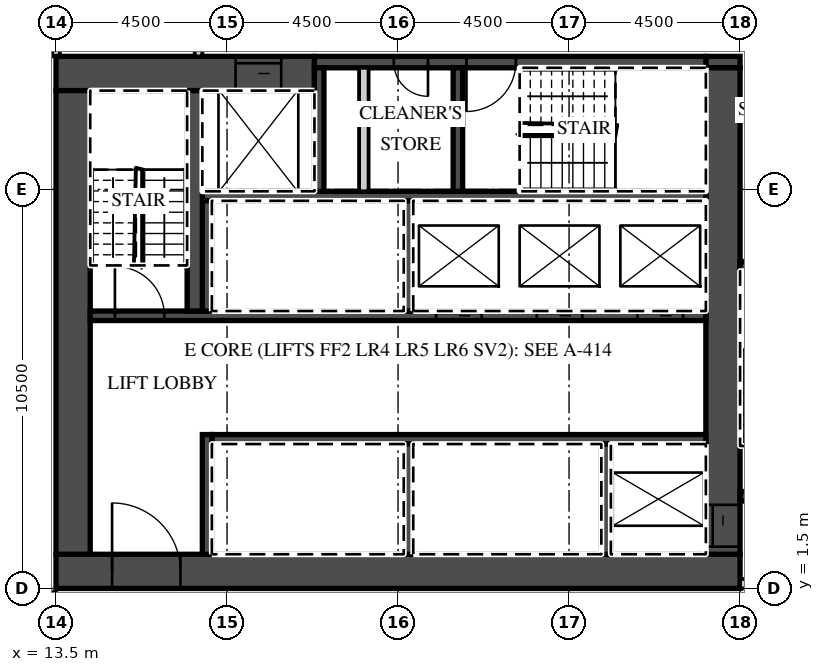
"""IFC4 building model, lengths in metres.
Left out: names, types, materials, properties, quantities, classifications, styles, units other than length and angle.
Written with IfcOpenShell. Run it as: python <this file> out.ifc"""

import sys

from ifc_helpers import new_model, si_unit, direction, frame, frame_2d, origin, place, context, subcontext, project, spatial, rectangle, extrude, element, fill, save


model = new_model("IFC4")
c1 = context("Model", 3, precision=1e-05, world=origin(), true_north=direction((0.0, 1.0)))
c2 = subcontext(c1, "Body", "Model", "MODEL_VIEW")
j1 = project(units=[si_unit("LENGTHUNIT", "METRE"), si_unit("PLANEANGLEUNIT", "RADIAN")], contexts=[c1])
p1 = place(None, origin())
s1 = spatial("IfcSite", under=j1, at=p1, CompositionType="ELEMENT")
p2 = place(p1, origin())
s2 = spatial("IfcBuilding", under=s1, at=p2, CompositionType="ELEMENT")
p3 = place(p2, frame((0.0, 0.0, 147.1)))
s3 = spatial("IfcBuildingStorey", under=s2, at=p3, CompositionType="ELEMENT", Elevation=147.1)
p4 = place(p3, frame((13.5, 15.5, 0.0), z_axis=(0.0, 0.0, 1.0), x_axis=(0.0, 1.0, 0.0)))
e1 = element("IfcWall", 1, at=p4, inside=s3, PredefinedType="PARTITIONING", context=c2, shape_type="SweptSolid", body=[
    extrude(rectangle(XDim=7.162, YDim=0.2, at=frame_2d((3.581, 0.0))), origin(), (0.0, 0.0, 1.0), 3.0),
])
p5 = place(p3, frame((-39.316, 1.3, 0.0), z_axis=(0.0, 0.0, 1.0), x_axis=(1.0, 0.0, 0.0)))
e2 = element("IfcWall", 2, at=p5, inside=s3, PredefinedType="PARTITIONING", context=c2, shape_type="SweptSolid", body=[
    extrude(rectangle(XDim=52.816, YDim=0.2, at=frame_2d((26.408, 0.0))), origin(), (0.0, 0.0, 1.0), 3.0),
])
p6 = place(p5, frame((0.15, 0.0, 0.0)))
e3 = element("IfcOpeningElement", 3, at=p6, cuts=e2, PredefinedType="OPENING", context=c2, shape_type="SweptSolid", body=[
    extrude(rectangle(XDim=0.9, YDim=2.1, at=frame_2d((0.45, 1.05))), frame((0.0, 0.11, 0.0), z_axis=(0.0, -1.0, 0.0), x_axis=(1.0, 0.0, 0.0)), (0.0, 0.0, 1.0), 0.22),
])
p7 = place(p5, frame((5.754, 0.0, 0.0)))
e4 = element("IfcOpeningElement", 4, at=p7, cuts=e2, PredefinedType="OPENING", context=c2, shape_type="SweptSolid", body=[
    extrude(rectangle(XDim=1.2, YDim=2.1, at=frame_2d((0.6, 1.05))), frame((0.0, 0.11, 0.0), z_axis=(0.0, -1.0, 0.0), x_axis=(1.0, 0.0, 0.0)), (0.0, 0.0, 1.0), 0.22),
])
p8 = place(p5, frame((14.754, 0.0, 0.0)))
e5 = element("IfcOpeningElement", 5, at=p8, cuts=e2, PredefinedType="OPENING", context=c2, shape_type="SweptSolid", body=[
    extrude(rectangle(XDim=1.2, YDim=2.1, at=frame_2d((0.6, 1.05))), frame((0.0, 0.11, 0.0), z_axis=(0.0, -1.0, 0.0), x_axis=(1.0, 0.0, 0.0)), (0.0, 0.0, 1.0), 0.22),
])
p9 = place(p5, frame((23.754, 0.0, 0.0)))
e6 = element("IfcOpeningElement", 6, at=p9, cuts=e2, PredefinedType="OPENING", context=c2, shape_type="SweptSolid", body=[
    extrude(rectangle(XDim=1.2, YDim=2.1, at=frame_2d((0.6, 1.05))), frame((0.0, 0.11, 0.0), z_axis=(0.0, -1.0, 0.0), x_axis=(1.0, 0.0, 0.0)), (0.0, 0.0, 1.0), 0.22),
])
p10 = place(p5, frame((35.678, 0.0, 0.0)))
e7 = element("IfcOpeningElement", 7, at=p10, cuts=e2, PredefinedType="OPENING", context=c2, shape_type="SweptSolid", body=[
    extrude(rectangle(XDim=1.2, YDim=2.1, at=frame_2d((0.6, 1.05))), frame((0.0, 0.11, 0.0), z_axis=(0.0, -1.0, 0.0), x_axis=(1.0, 0.0, 0.0)), (0.0, 0.0, 1.0), 0.22),
])
p11 = place(p5, frame((44.678, 0.0, 0.0)))
e8 = element("IfcOpeningElement", 8, at=p11, cuts=e2, PredefinedType="OPENING", context=c2, shape_type="SweptSolid", body=[
    extrude(rectangle(XDim=1.2, YDim=2.1, at=frame_2d((0.6, 1.05))), frame((0.0, 0.11, 0.0), z_axis=(0.0, -1.0, 0.0), x_axis=(1.0, 0.0, 0.0)), (0.0, 0.0, 1.0), 0.22),
])
p12 = place(p5, frame((51.241, 0.0, 0.0)))
e9 = element("IfcOpeningElement", 9, at=p12, cuts=e2, PredefinedType="OPENING", context=c2, shape_type="SweptSolid", body=[
    extrude(rectangle(XDim=1.0, YDim=2.1, at=frame_2d((0.5, 1.05))), frame((0.0, 0.11, 0.0), z_axis=(0.0, -1.0, 0.0), x_axis=(1.0, 0.0, 0.0)), (0.0, 0.0, 1.0), 0.22),
])
p13 = place(p3, frame((13.5, 1.95, 0.0), z_axis=(0.0, 0.0, 1.0), x_axis=(1.0, 0.0, 0.0)))
e10 = element("IfcWall", 10, at=p13, inside=s3, PredefinedType="SHEAR", context=c2, shape_type="SweptSolid", body=[
    extrude(rectangle(XDim=18.0, YDim=0.9, at=frame_2d((9.0, 0.0))), origin(), (0.0, 0.0, 1.0), 3.0),
])
p14 = place(p13, frame((1.475, 0.0, 0.0)))
e11 = element("IfcOpeningElement", 11, at=p14, cuts=e10, PredefinedType="OPENING", context=c2, shape_type="SweptSolid", body=[
    extrude(rectangle(XDim=1.8, YDim=2.1, at=frame_2d((0.9, 1.05))), frame((0.0, 0.46, 0.0), z_axis=(0.0, -1.0, 0.0), x_axis=(1.0, 0.0, 0.0)), (0.0, 0.0, 1.0), 0.92),
])
p15 = place(p3, frame((13.5, 15.05, 0.0), z_axis=(0.0, 0.0, 1.0), x_axis=(1.0, 0.0, 0.0)))
e12 = element("IfcWall", 12, at=p15, inside=s3, PredefinedType="SHEAR", context=c2, shape_type="SweptSolid", body=[
    extrude(rectangle(XDim=6.8, YDim=0.9, at=frame_2d((3.4, 0.0))), origin(), (0.0, 0.0, 1.0), 3.0),
])
p16 = place(p15, frame((4.725, 0.0, 0.0)))
e13 = element("IfcOpeningElement", 13, at=p16, cuts=e12, PredefinedType="OPENING", context=c2, shape_type="SweptSolid", body=[
    extrude(rectangle(XDim=1.2, YDim=2.1, at=frame_2d((0.6, 1.05))), frame((0.0, 0.46, 0.0), z_axis=(0.0, -1.0, 0.0), x_axis=(1.0, 0.0, 0.0)), (0.0, 0.0, 1.0), 0.92),
])
p17 = place(p3, frame((30.6, 15.35, 0.0), z_axis=(0.0, 0.0, 1.0), x_axis=(1.0, 0.0, 0.0)))
e14 = element("IfcWall", 14, at=p17, inside=s3, PredefinedType="SHEAR", context=c2, shape_type="SweptSolid", body=[
    extrude(rectangle(XDim=0.9, YDim=0.3, at=frame_2d((0.45, 0.0))), origin(), (0.0, 0.0, 1.0), 3.0),
])
p18 = place(p3, frame((20.3, 15.35, 0.0), z_axis=(0.0, 0.0, 1.0), x_axis=(1.0, 0.0, 0.0)))
e15 = element("IfcWall", 15, at=p18, inside=s3, PredefinedType="SHEAR", context=c2, shape_type="SweptSolid", body=[
    extrude(rectangle(XDim=10.3, YDim=0.3, at=frame_2d((5.15, 0.0))), origin(), (0.0, 0.0, 1.0), 3.0),
])
p19 = place(p18, frame((4.0, 0.0, 0.0)))
e16 = element("IfcOpeningElement", 16, at=p19, cuts=e15, PredefinedType="OPENING", context=c2, shape_type="SweptSolid", body=[
    extrude(rectangle(XDim=1.3, YDim=2.1, at=frame_2d((0.65, 1.05))), frame((0.0, 0.16, 0.0), z_axis=(0.0, -1.0, 0.0), x_axis=(1.0, 0.0, 0.0)), (0.0, 0.0, 1.0), 0.32),
])
p20 = place(p18, frame((2.087, 0.0, 0.0)))
e17 = element("IfcOpeningElement", 17, at=p20, cuts=e15, PredefinedType="OPENING", context=c2, shape_type="SweptSolid", body=[
    extrude(rectangle(XDim=0.9, YDim=2.1, at=frame_2d((0.45, 1.05))), frame((0.0, 0.16, 0.0), z_axis=(0.0, -1.0, 0.0), x_axis=(1.0, 0.0, 0.0)), (0.0, 0.0, 1.0), 0.32),
])
p21 = place(p3, frame((31.05, 2.4, 0.0), z_axis=(0.0, 0.0, 1.0), x_axis=(0.0, 1.0, 0.0)))
e18 = element("IfcWall", 18, at=p21, inside=s3, PredefinedType="SHEAR", context=c2, shape_type="SweptSolid", body=[
    extrude(rectangle(XDim=12.8, YDim=0.9, at=frame_2d((6.4, 0.0))), origin(), (0.0, 0.0, 1.0), 3.0),
])
p22 = place(p21, frame((0.2, 0.0, 0.0)))
e19 = element("IfcOpeningElement", 19, at=p22, cuts=e18, PredefinedType="OPENING", context=c2, shape_type="SweptSolid", body=[
    extrude(rectangle(XDim=1.1, YDim=2.1, at=frame_2d((0.55, 1.05))), frame((0.0, 0.46, 0.0), z_axis=(0.0, -1.0, 0.0), x_axis=(1.0, 0.0, 0.0)), (0.0, 0.0, 1.0), 0.92),
])
p23 = place(p3, frame((13.95, 2.4, 0.0), z_axis=(0.0, 0.0, 1.0), x_axis=(0.0, 1.0, 0.0)))
e20 = element("IfcWall", 20, at=p23, inside=s3, PredefinedType="SHEAR", context=c2, shape_type="SweptSolid", body=[
    extrude(rectangle(XDim=12.2, YDim=0.9, at=frame_2d((6.1, 0.0))), origin(), (0.0, 0.0, 1.0), 3.0),
])
p24 = place(p3, frame((17.6, 5.425, 0.0), z_axis=(0.0, 0.0, 1.0), x_axis=(1.0, 0.0, 0.0)))
e21 = element("IfcWall", 21, at=p24, inside=s3, PredefinedType="SHEAR", context=c2, shape_type="SweptSolid", body=[
    extrude(rectangle(XDim=13.0, YDim=0.25, at=frame_2d((6.5, 0.0))), origin(), (0.0, 0.0, 1.0), 3.0),
])
p25 = place(p3, frame((17.475, 2.4, 0.0), z_axis=(0.0, 0.0, 1.0), x_axis=(0.0, 1.0, 0.0)))
e22 = element("IfcWall", 22, at=p25, inside=s3, PredefinedType="SHEAR", context=c2, shape_type="SweptSolid", body=[
    extrude(rectangle(XDim=3.15, YDim=0.25, at=frame_2d((1.575, 0.0))), origin(), (0.0, 0.0, 1.0), 3.0),
])
for number, where, z_axis, x_axis in (
    (23, (27.975, 2.4, 0.0), (0.0, 0.0, 1.0), (0.0, 1.0, 0.0)),
    (24, (22.775, 2.4, 0.0), (0.0, 0.0, 1.0), (0.0, 1.0, 0.0)),
):
    element("IfcWall", number, at=place(p3, frame(where, z_axis=z_axis, x_axis=x_axis)), inside=s3, PredefinedType="SHEAR", context=c2, shape_type="SweptSolid", body=[
        extrude(rectangle(XDim=2.9, YDim=0.25, at=frame_2d((1.45, 0.0))), origin(), (0.0, 0.0, 1.0), 3.0),
    ])
p26 = place(p3, frame((14.4, 8.675, 0.0), z_axis=(0.0, 0.0, 1.0), x_axis=(1.0, 0.0, 0.0)))
e25 = element("IfcWall", 25, at=p26, inside=s3, PredefinedType="SHEAR", context=c2, shape_type="SweptSolid", body=[
    extrude(rectangle(XDim=16.2, YDim=0.25, at=frame_2d((8.1, 0.0))), origin(), (0.0, 0.0, 1.0), 3.0),
])
p27 = place(p26, frame((14.4, 0.0, 0.0)))
e26 = element("IfcOpeningElement", 26, at=p27, cuts=e25, PredefinedType="OPENING", context=c2, shape_type="SweptSolid", body=[
    extrude(rectangle(XDim=1.2, YDim=2.1, at=frame_2d((0.6, 1.05))), frame((0.0, 0.135, 0.0), z_axis=(0.0, -1.0, 0.0), x_axis=(1.0, 0.0, 0.0)), (0.0, 0.0, 1.0), 0.27),
])
p28 = place(p26, frame((11.75, 0.0, 0.0)))
e27 = element("IfcOpeningElement", 27, at=p28, cuts=e25, PredefinedType="OPENING", context=c2, shape_type="SweptSolid", body=[
    extrude(rectangle(XDim=1.2, YDim=2.1, at=frame_2d((0.6, 1.05))), frame((0.0, 0.135, 0.0), z_axis=(0.0, -1.0, 0.0), x_axis=(1.0, 0.0, 0.0)), (0.0, 0.0, 1.0), 0.27),
])
p29 = place(p26, frame((9.1, 0.0, 0.0)))
e28 = element("IfcOpeningElement", 28, at=p29, cuts=e25, PredefinedType="OPENING", context=c2, shape_type="SweptSolid", body=[
    extrude(rectangle(XDim=1.2, YDim=2.1, at=frame_2d((0.6, 1.05))), frame((0.0, 0.135, 0.0), z_axis=(0.0, -1.0, 0.0), x_axis=(1.0, 0.0, 0.0)), (0.0, 0.0, 1.0), 0.27),
])
p30 = place(p26, frame((0.65, 0.0, 0.0)))
e29 = element("IfcOpeningElement", 29, at=p30, cuts=e25, PredefinedType="OPENING", context=c2, shape_type="SweptSolid", body=[
    extrude(rectangle(XDim=1.3, YDim=2.1, at=frame_2d((0.65, 1.05))), frame((0.0, 0.135, 0.0), z_axis=(0.0, -1.0, 0.0), x_axis=(1.0, 0.0, 0.0)), (0.0, 0.0, 1.0), 0.27),
])
p31 = place(p3, frame((17.35, 11.825, 0.0), z_axis=(0.0, 0.0, 1.0), x_axis=(1.0, 0.0, 0.0)))
e30 = element("IfcWall", 30, at=p31, inside=s3, PredefinedType="SHEAR", context=c2, shape_type="SweptSolid", body=[
    extrude(rectangle(XDim=13.25, YDim=0.25, at=frame_2d((6.625, 0.0))), origin(), (0.0, 0.0, 1.0), 3.0),
])
for number, where, z_axis, x_axis in (
    (31, (17.475, 8.8, 0.0), (0.0, 0.0, 1.0), (0.0, 1.0, 0.0)),
    (32, (22.775, 8.8, 0.0), (0.0, 0.0, 1.0), (0.0, 1.0, 0.0)),
):
    element("IfcWall", number, at=place(p3, frame(where, z_axis=z_axis, x_axis=x_axis)), inside=s3, PredefinedType="SHEAR", context=c2, shape_type="SweptSolid", body=[
        extrude(rectangle(XDim=2.9, YDim=0.25, at=frame_2d((1.45, 0.0))), origin(), (0.0, 0.0, 1.0), 3.0),
    ])
p32 = place(p3, frame((17.15, 8.8, 0.0), z_axis=(0.0, 0.0, 1.0), x_axis=(0.0, 1.0, 0.0)))
e33 = element("IfcWall", 33, at=p32, inside=s3, PredefinedType="SHEAR", context=c2, shape_type="SweptSolid", body=[
    extrude(rectangle(XDim=5.8, YDim=0.4, at=frame_2d((2.9, 0.0))), origin(), (0.0, 0.0, 1.0), 3.0),
])
for number, where, z_axis, x_axis in (
    (34, (20.425, 11.95, 0.0), (0.0, 0.0, 1.0), (0.0, 1.0, 0.0)),
    (35, (24.075, 11.95, 0.0), (0.0, 0.0, 1.0), (0.0, 1.0, 0.0)),
):
    element("IfcWall", number, at=place(p3, frame(where, z_axis=z_axis, x_axis=x_axis)), inside=s3, PredefinedType="SHEAR", context=c2, shape_type="SweptSolid", body=[
        extrude(rectangle(XDim=3.25, YDim=0.25, at=frame_2d((1.625, 0.0))), origin(), (0.0, 0.0, 1.0), 3.0),
    ])
p33 = place(p3, frame((21.6, 11.95, 0.0), z_axis=(0.0, 0.0, 1.0), x_axis=(0.0, 1.0, 0.0)))
e36 = element("IfcWall", 36, at=p33, inside=s3, PredefinedType="PARTITIONING", context=c2, shape_type="SweptSolid", body=[
    extrude(rectangle(XDim=3.25, YDim=0.25, at=frame_2d((1.625, 0.0))), origin(), (0.0, 0.0, 1.0), 3.0),
])
p34 = place(p3, frame((31.5, 1.625, 0.0), z_axis=(0.0, 0.0, 1.0), x_axis=(1.0, 0.0, 0.0)))
e37 = element("IfcWall", 37, at=p34, inside=s3, PredefinedType="PARTITIONING", context=c2, shape_type="SweptSolid", body=[
    extrude(rectangle(XDim=15.65, YDim=0.25, at=frame_2d((7.825, 0.0))), origin(), (0.0, 0.0, 1.0), 3.0),
])
p35 = place(p34, frame((0.625, 0.0, 0.0)))
e38 = element("IfcOpeningElement", 38, at=p35, cuts=e37, PredefinedType="OPENING", context=c2, shape_type="SweptSolid", body=[
    extrude(rectangle(XDim=1.3, YDim=2.1, at=frame_2d((0.65, 1.05))), frame((0.0, 0.135, 0.0), z_axis=(0.0, -1.0, 0.0), x_axis=(1.0, 0.0, 0.0)), (0.0, 0.0, 1.0), 0.27),
])
p36 = place(p34, frame((3.25, 0.0, 0.0)))
e39 = element("IfcOpeningElement", 39, at=p36, cuts=e37, PredefinedType="OPENING", context=c2, shape_type="SweptSolid", body=[
    extrude(rectangle(XDim=1.1, YDim=2.1, at=frame_2d((0.55, 1.05))), frame((0.0, 0.135, 0.0), z_axis=(0.0, -1.0, 0.0), x_axis=(1.0, 0.0, 0.0)), (0.0, 0.0, 1.0), 0.27),
])
p37 = place(p3, frame((31.5, 3.925, 0.0), z_axis=(0.0, 0.0, 1.0), x_axis=(1.0, 0.0, 0.0)))
e40 = element("IfcWall", 40, at=p37, inside=s3, PredefinedType="SHEAR", context=c2, shape_type="SweptSolid", body=[
    extrude(rectangle(XDim=2.55, YDim=0.25, at=frame_2d((1.275, 0.0))), origin(), (0.0, 0.0, 1.0), 3.0),
])
p38 = place(p37, frame((0.625, 0.0, 0.0)))
e41 = element("IfcOpeningElement", 41, at=p38, cuts=e40, PredefinedType="OPENING", context=c2, shape_type="SweptSolid", body=[
    extrude(rectangle(XDim=1.3, YDim=2.1, at=frame_2d((0.65, 1.05))), frame((0.0, 0.135, 0.0), z_axis=(0.0, -1.0, 0.0), x_axis=(1.0, 0.0, 0.0)), (0.0, 0.0, 1.0), 0.27),
])
p39 = place(p3, frame((31.5, 9.975, 0.0), z_axis=(0.0, 0.0, 1.0), x_axis=(1.0, 0.0, 0.0)))
e42 = element("IfcWall", 42, at=p39, inside=s3, PredefinedType="SHEAR", context=c2, shape_type="SweptSolid", body=[
    extrude(rectangle(XDim=2.55, YDim=0.25, at=frame_2d((1.275, 0.0))), origin(), (0.0, 0.0, 1.0), 3.0),
])
p40 = place(p3, frame((17.25, 15.5, 0.0), z_axis=(0.0, 0.0, 1.0), x_axis=(0.0, 1.0, 0.0)))
e43 = element("IfcWall", 43, at=p40, inside=s3, PredefinedType="PARTITIONING", context=c2, shape_type="SweptSolid", body=[
    extrude(rectangle(XDim=2.2, YDim=0.2, at=frame_2d((1.1, 0.0))), origin(), (0.0, 0.0, 1.0), 3.0),
])
p41 = place(p27, origin())
e44 = element("IfcDoor", 44, at=p41, inside=s3, OperationType="SLIDING_TO_LEFT", PredefinedType="DOOR", context=c2, shape_type="SweptSolid", body=[
    extrude(rectangle(XDim=1.2, YDim=2.1, at=frame_2d((0.6, 1.05))), frame((0.0, 0.025, 0.0), z_axis=(0.0, -1.0, 0.0), x_axis=(1.0, 0.0, 0.0)), (0.0, 0.0, 1.0), 0.05),
])
fill(e26, e44)
p42 = place(p28, origin())
e45 = element("IfcDoor", 45, at=p42, inside=s3, OperationType="SLIDING_TO_RIGHT", PredefinedType="DOOR", context=c2, shape_type="SweptSolid", body=[
    extrude(rectangle(XDim=1.2, YDim=2.1, at=frame_2d((0.6, 1.05))), frame((0.0, 0.025, 0.0), z_axis=(0.0, -1.0, 0.0), x_axis=(1.0, 0.0, 0.0)), (0.0, 0.0, 1.0), 0.05),
])
fill(e27, e45)
p43 = place(p29, origin())
e46 = element("IfcDoor", 46, at=p43, inside=s3, OperationType="SLIDING_TO_RIGHT", PredefinedType="DOOR", context=c2, shape_type="SweptSolid", body=[
    extrude(rectangle(XDim=1.2, YDim=2.1, at=frame_2d((0.6, 1.05))), frame((0.0, 0.025, 0.0), z_axis=(0.0, -1.0, 0.0), x_axis=(1.0, 0.0, 0.0)), (0.0, 0.0, 1.0), 0.05),
])
fill(e28, e46)
p44 = place(p16, origin())
e47 = element("IfcDoor", 47, at=p44, inside=s3, OperationType="SLIDING_TO_LEFT", PredefinedType="DOOR", context=c2, shape_type="SweptSolid", body=[
    extrude(rectangle(XDim=1.2, YDim=2.1, at=frame_2d((0.6, 1.05))), frame((0.0, 0.025, 0.0), z_axis=(0.0, -1.0, 0.0), x_axis=(1.0, 0.0, 0.0)), (0.0, 0.0, 1.0), 0.05),
])
fill(e13, e47)
p45 = place(p22, origin())
e48 = element("IfcDoor", 48, at=p45, inside=s3, OperationType="SLIDING_TO_LEFT", PredefinedType="DOOR", context=c2, shape_type="SweptSolid", body=[
    extrude(rectangle(XDim=1.1, YDim=2.1, at=frame_2d((0.55, 1.05))), frame((0.0, 0.025, 0.0), z_axis=(0.0, -1.0, 0.0), x_axis=(1.0, 0.0, 0.0)), (0.0, 0.0, 1.0), 0.05),
])
fill(e19, e48)
p46 = place(p14, origin())
e49 = element("IfcDoor", 49, at=p46, inside=s3, OperationType="DOUBLE_DOOR_DOUBLE_SWING", PredefinedType="DOOR", context=c2, shape_type="SweptSolid", body=[
    extrude(rectangle(XDim=1.8, YDim=2.1, at=frame_2d((0.9, 1.05))), frame((0.0, 0.025, 0.0), z_axis=(0.0, -1.0, 0.0), x_axis=(1.0, 0.0, 0.0)), (0.0, 0.0, 1.0), 0.05),
])
fill(e11, e49)
p47 = place(p30, origin())
e50 = element("IfcDoor", 50, at=p47, inside=s3, OperationType="SINGLE_SWING_LEFT", PredefinedType="DOOR", context=c2, shape_type="SweptSolid", body=[
    extrude(rectangle(XDim=1.3, YDim=2.1, at=frame_2d((0.65, 1.05))), frame((0.0, 0.025, 0.0), z_axis=(0.0, -1.0, 0.0), x_axis=(1.0, 0.0, 0.0)), (0.0, 0.0, 1.0), 0.05),
])
fill(e29, e50)
p48 = place(p19, origin())
e51 = element("IfcDoor", 51, at=p48, inside=s3, OperationType="SINGLE_SWING_LEFT", PredefinedType="DOOR", context=c2, shape_type="SweptSolid", body=[
    extrude(rectangle(XDim=1.3, YDim=2.1, at=frame_2d((0.65, 1.05))), frame((0.0, 0.025, 0.0), z_axis=(0.0, -1.0, 0.0), x_axis=(1.0, 0.0, 0.0)), (0.0, 0.0, 1.0), 0.05),
])
fill(e16, e51)
p49 = place(p20, origin())
e52 = element("IfcDoor", 52, at=p49, inside=s3, OperationType="SINGLE_SWING_RIGHT", PredefinedType="DOOR", context=c2, shape_type="SweptSolid", body=[
    extrude(rectangle(XDim=0.9, YDim=2.1, at=frame_2d((0.45, 1.05))), frame((0.0, 0.025, 0.0), z_axis=(0.0, -1.0, 0.0), x_axis=(1.0, 0.0, 0.0)), (0.0, 0.0, 1.0), 0.05),
])
fill(e17, e52)
save(model, sys.argv[1])
